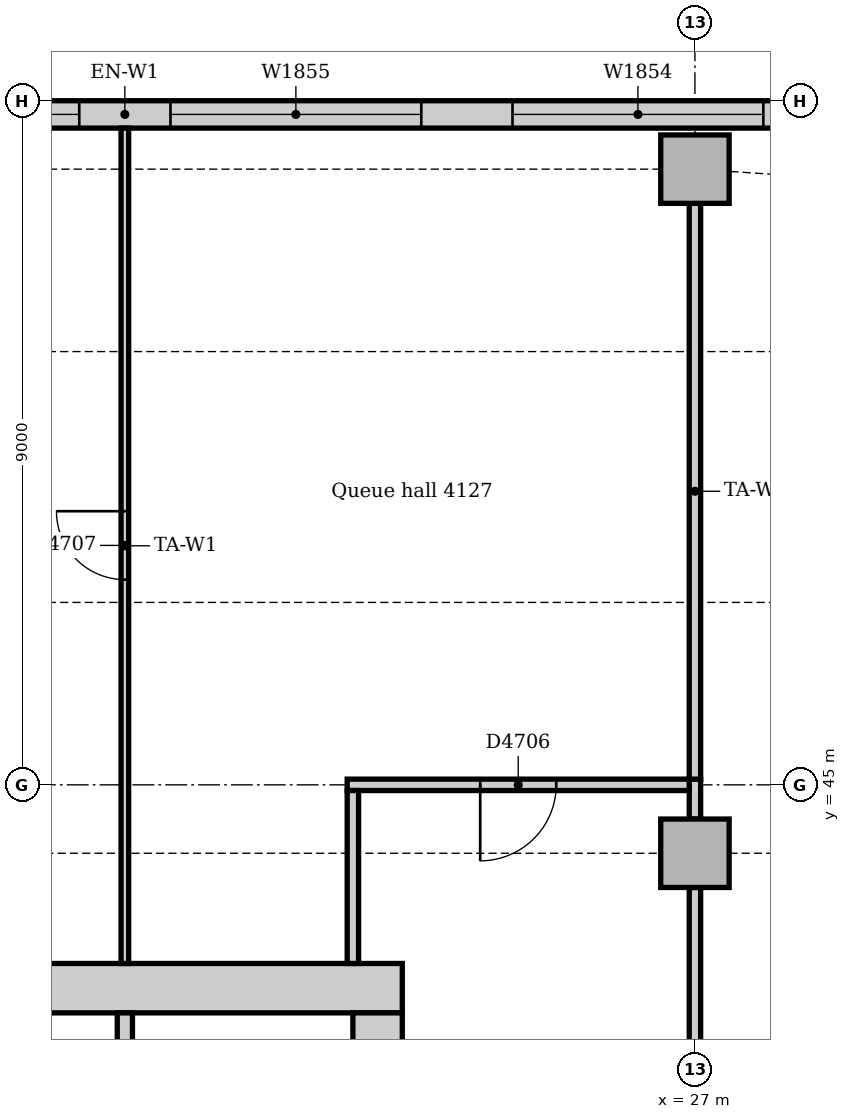
"""IFC4 building model, lengths in metres.
Left out: names, types, materials, properties, quantities, classifications, styles, units other than length and angle.
Written with IfcOpenShell. Run it as: python <this file> out.ifc"""

import sys

from ifc_helpers import new_model, si_unit, direction, frame, frame_2d, origin, origin_2d, place, context, subcontext, project, spatial, rectangle, extrude, element, fill, save


model = new_model("IFC4")
c1 = context("Model", 3, precision=1e-05, world=origin(), true_north=direction((0.0, 1.0)))
c2 = subcontext(c1, "Body", "Model", "MODEL_VIEW")
j1 = project(units=[si_unit("LENGTHUNIT", "METRE"), si_unit("PLANEANGLEUNIT", "RADIAN")], contexts=[c1])
p1 = place(None, origin())
s1 = spatial("IfcSite", under=j1, at=p1, CompositionType="ELEMENT")
p2 = place(p1, origin())
s2 = spatial("IfcBuilding", under=s1, at=p2, CompositionType="ELEMENT")
p3 = place(p2, frame((0.0, 0.0, 173.0)))
s3 = spatial("IfcBuildingStorey", under=s2, at=p3, CompositionType="ELEMENT", Elevation=173.0)
p4 = place(p3, frame((23.15, 42.325, 0.0), z_axis=(0.0, 0.0, 1.0), x_axis=(-1.0, 0.0, 0.0)))
e1 = element("IfcWall", 1, at=p4, inside=s3, PredefinedType="SOLIDWALL", context=c2, shape_type="SweptSolid", body=[
    extrude(rectangle(XDim=19.25, YDim=0.65, at=frame_2d((9.625, 0.0))), origin(), (0.0, 0.0, 1.0), 4.0),
])
p5 = place(p3, frame((22.825, 31.5, 0.0), z_axis=(0.0, 0.0, 1.0), x_axis=(0.0, 1.0, 0.0)))
e2 = element("IfcWall", 2, at=p5, inside=s3, PredefinedType="SOLIDWALL", context=c2, shape_type="SweptSolid", body=[
    extrude(rectangle(XDim=10.5, YDim=0.65, at=frame_2d((5.25, 0.0))), origin(), (0.0, 0.0, 1.0), 4.0),
])
p6 = place(p5, frame((3.15, 0.0, 0.0)))
e3 = element("IfcOpeningElement", 3, at=p6, cuts=e2, PredefinedType="OPENING", context=c2, shape_type="SweptSolid", body=[
    extrude(rectangle(XDim=1.0, YDim=2.1, at=frame_2d((0.5, 1.05))), frame((0.0, 0.335, 0.0), z_axis=(0.0, -1.0, 0.0), x_axis=(1.0, 0.0, 0.0)), (0.0, 0.0, 1.0), 0.67),
])
p7 = place(p5, frame((5.2, 0.0, 0.0)))
e4 = element("IfcOpeningElement", 4, at=p7, cuts=e2, PredefinedType="OPENING", context=c2, shape_type="SweptSolid", body=[
    extrude(rectangle(XDim=1.0, YDim=2.1, at=frame_2d((0.5, 1.05))), frame((0.0, 0.335, 0.0), z_axis=(0.0, -1.0, 0.0), x_axis=(1.0, 0.0, 0.0)), (0.0, 0.0, 1.0), 0.67),
])
for number, where, z_axis, x_axis in (
    (5, (27.0, 53.1, 0.0), (0.0, 0.0, 1.0), (1.0, 0.0, 0.0)),
    (6, (27.0, 44.1, 0.0), (0.0, 0.0, 1.0), (1.0, 0.0, 0.0)),
):
    element("IfcColumn", number, at=place(p3, frame(where, z_axis=z_axis, x_axis=x_axis)), inside=s3, PredefinedType="COLUMN", context=c2, shape_type="SweptSolid", body=[
        extrude(rectangle(XDim=0.9, YDim=0.9, at=origin_2d()), origin(), (0.0, 0.0, 1.0), 3.85),
    ])
p8 = place(p3, frame((34.757, 53.82, 0.0), z_axis=(0.0, 0.0, 1.0), x_axis=(-1.0, 0.0, 0.0)))
e7 = element("IfcWall", 7, at=p8, inside=s3, PredefinedType="STANDARD", context=c2, shape_type="SweptSolid", body=[
    extrude(rectangle(XDim=30.515, YDim=0.36, at=frame_2d((15.257, 0.0))), origin(), (0.0, 0.0, 1.0), 3.85),
])
p9 = place(p8, frame((2.357, 0.0, 0.9)))
e8 = element("IfcOpeningElement", 8, at=p9, cuts=e7, PredefinedType="OPENING", context=c2, shape_type="SweptSolid", body=[
    extrude(rectangle(XDim=3.3, YDim=1.6, at=frame_2d((1.65, 0.8))), frame((0.0, 0.19, 0.0), z_axis=(0.0, -1.0, 0.0), x_axis=(1.0, 0.0, 0.0)), (0.0, 0.0, 1.0), 0.38),
])
p10 = place(p8, frame((6.857, 0.0, 0.9)))
e9 = element("IfcOpeningElement", 9, at=p10, cuts=e7, PredefinedType="OPENING", context=c2, shape_type="SweptSolid", body=[
    extrude(rectangle(XDim=3.3, YDim=1.6, at=frame_2d((1.65, 0.8))), frame((0.0, 0.19, 0.0), z_axis=(0.0, -1.0, 0.0), x_axis=(1.0, 0.0, 0.0)), (0.0, 0.0, 1.0), 0.38),
])
p11 = place(p8, frame((11.357, 0.0, 0.9)))
e10 = element("IfcOpeningElement", 10, at=p11, cuts=e7, PredefinedType="OPENING", context=c2, shape_type="SweptSolid", body=[
    extrude(rectangle(XDim=3.3, YDim=1.6, at=frame_2d((1.65, 0.8))), frame((0.0, 0.19, 0.0), z_axis=(0.0, -1.0, 0.0), x_axis=(1.0, 0.0, 0.0)), (0.0, 0.0, 1.0), 0.38),
])
p12 = place(p8, frame((15.857, 0.0, 0.9)))
e11 = element("IfcOpeningElement", 11, at=p12, cuts=e7, PredefinedType="OPENING", context=c2, shape_type="SweptSolid", body=[
    extrude(rectangle(XDim=3.3, YDim=1.6, at=frame_2d((1.65, 0.8))), frame((0.0, 0.19, 0.0), z_axis=(0.0, -1.0, 0.0), x_axis=(1.0, 0.0, 0.0)), (0.0, 0.0, 1.0), 0.38),
])
p13 = place(p8, frame((20.357, 0.0, 0.9)))
e12 = element("IfcOpeningElement", 12, at=p13, cuts=e7, PredefinedType="OPENING", context=c2, shape_type="SweptSolid", body=[
    extrude(rectangle(XDim=3.3, YDim=1.6, at=frame_2d((1.65, 0.8))), frame((0.0, 0.19, 0.0), z_axis=(0.0, -1.0, 0.0), x_axis=(1.0, 0.0, 0.0)), (0.0, 0.0, 1.0), 0.38),
])
p14 = place(p8, frame((24.857, 0.0, 0.9)))
e13 = element("IfcOpeningElement", 13, at=p14, cuts=e7, PredefinedType="OPENING", context=c2, shape_type="SweptSolid", body=[
    extrude(rectangle(XDim=3.3, YDim=1.6, at=frame_2d((1.65, 0.8))), frame((0.0, 0.19, 0.0), z_axis=(0.0, -1.0, 0.0), x_axis=(1.0, 0.0, 0.0)), (0.0, 0.0, 1.0), 0.38),
])
p15 = place(p3, frame((19.5, 38.6, 0.0), z_axis=(0.0, 0.0, 1.0), x_axis=(0.0, 1.0, 0.0)))
e14 = element("IfcWall", 14, at=p15, inside=s3, PredefinedType="PARTITIONING", context=c2, shape_type="SweptSolid", body=[
    extrude(rectangle(XDim=3.4, YDim=0.2, at=frame_2d((1.7, 0.0))), origin(), (0.0, 0.0, 1.0), 3.85),
])
p16 = place(p3, frame((27.0, 36.45, 0.0), z_axis=(0.0, 0.0, 1.0), x_axis=(0.0, 1.0, 0.0)))
e15 = element("IfcWall", 15, at=p16, inside=s3, PredefinedType="PARTITIONING", context=c2, shape_type="SweptSolid", body=[
    extrude(rectangle(XDim=7.2, YDim=0.15, at=frame_2d((3.6, 0.0))), origin(), (0.0, 0.0, 1.0), 3.362),
])
p17 = place(p3, frame((27.0, 44.55, 0.0), z_axis=(0.0, 0.0, 1.0), x_axis=(0.0, 1.0, 0.0)))
e16 = element("IfcWall", 16, at=p17, inside=s3, PredefinedType="PARTITIONING", context=c2, shape_type="SweptSolid", body=[
    extrude(rectangle(XDim=0.525, YDim=0.15, at=frame_2d((0.263, 0.0))), origin(), (0.0, 0.0, 1.0), 3.362),
])
p18 = place(p3, frame((22.425, 45.0, 0.0), z_axis=(0.0, 0.0, 1.0), x_axis=(1.0, 0.0, 0.0)))
e17 = element("IfcWall", 17, at=p18, inside=s3, PredefinedType="PARTITIONING", context=c2, shape_type="SweptSolid", body=[
    extrude(rectangle(XDim=4.5, YDim=0.15, at=frame_2d((2.25, 0.0))), origin(), (0.0, 0.0, 1.0), 3.85),
])
p19 = place(p18, frame((1.75, 0.0, 0.0)))
e18 = element("IfcOpeningElement", 18, at=p19, cuts=e17, PredefinedType="OPENING", context=c2, shape_type="SweptSolid", body=[
    extrude(rectangle(XDim=1.0, YDim=2.1, at=frame_2d((0.5, 1.05))), frame((0.0, 0.085, 0.0), z_axis=(0.0, -1.0, 0.0), x_axis=(1.0, 0.0, 0.0)), (0.0, 0.0, 1.0), 0.17),
])
p20 = place(p3, frame((22.5, 42.65, 0.0), z_axis=(0.0, 0.0, 1.0), x_axis=(0.0, 1.0, 0.0)))
e19 = element("IfcWall", 19, at=p20, inside=s3, PredefinedType="PARTITIONING", context=c2, shape_type="SweptSolid", body=[
    extrude(rectangle(XDim=2.275, YDim=0.15, at=frame_2d((1.137, 0.0))), origin(), (0.0, 0.0, 1.0), 3.85),
])
p21 = place(p3, frame((27.0, 45.075, 0.0), z_axis=(0.0, 0.0, 1.0), x_axis=(0.0, 1.0, 0.0)))
e20 = element("IfcWall", 20, at=p21, inside=s3, PredefinedType="PARTITIONING", context=c2, shape_type="SweptSolid", body=[
    extrude(rectangle(XDim=7.575, YDim=0.15, at=frame_2d((3.788, 0.0))), origin(), (0.0, 0.0, 1.0), 3.362),
])
p22 = place(p3, frame((19.5, 42.65, 0.0), z_axis=(0.0, 0.0, 1.0), x_axis=(0.0, 1.0, 0.0)))
e21 = element("IfcWall", 21, at=p22, inside=s3, PredefinedType="PARTITIONING", context=c2, shape_type="SweptSolid", body=[
    extrude(rectangle(XDim=10.99, YDim=0.1, at=frame_2d((5.495, 0.0))), origin(), (0.0, 0.0, 1.0), 3.85),
])
p23 = place(p22, frame((5.05, 0.0, 0.0)))
e22 = element("IfcOpeningElement", 22, at=p23, cuts=e21, PredefinedType="OPENING", context=c2, shape_type="SweptSolid", body=[
    extrude(rectangle(XDim=0.9, YDim=2.1, at=frame_2d((0.45, 1.05))), frame((0.0, 0.06, 0.0), z_axis=(0.0, -1.0, 0.0), x_axis=(1.0, 0.0, 0.0)), (0.0, 0.0, 1.0), 0.12),
])
p24 = place(p10, origin())
e23 = element("IfcWindow", 23, at=p24, inside=s3, PartitioningType="SINGLE_PANEL", PredefinedType="WINDOW", context=c2, shape_type="SweptSolid", body=[
    extrude(rectangle(XDim=3.3, YDim=1.6, at=frame_2d((1.65, 0.8))), frame((0.0, 0.13, 0.0), z_axis=(0.0, -1.0, 0.0), x_axis=(1.0, 0.0, 0.0)), (0.0, 0.0, 1.0), 0.06),
])
fill(e9, e23)
p25 = place(p11, origin())
e24 = element("IfcWindow", 24, at=p25, inside=s3, PartitioningType="SINGLE_PANEL", PredefinedType="WINDOW", context=c2, shape_type="SweptSolid", body=[
    extrude(rectangle(XDim=3.3, YDim=1.6, at=frame_2d((1.65, 0.8))), frame((0.0, 0.13, 0.0), z_axis=(0.0, -1.0, 0.0), x_axis=(1.0, 0.0, 0.0)), (0.0, 0.0, 1.0), 0.06),
])
fill(e10, e24)
p26 = place(p12, origin())
e25 = element("IfcWindow", 25, at=p26, inside=s3, PartitioningType="SINGLE_PANEL", PredefinedType="WINDOW", context=c2, shape_type="SweptSolid", body=[
    extrude(rectangle(XDim=3.3, YDim=1.6, at=frame_2d((1.65, 0.8))), frame((0.0, 0.13, 0.0), z_axis=(0.0, -1.0, 0.0), x_axis=(1.0, 0.0, 0.0)), (0.0, 0.0, 1.0), 0.06),
])
fill(e11, e25)
p27 = place(p19, frame((1.0, 0.0, 0.0), z_axis=(0.0, 0.0, 1.0), x_axis=(-1.0, 0.0, 0.0)))
e26 = element("IfcDoor", 26, at=p27, inside=s3, OperationType="SINGLE_SWING_RIGHT", PredefinedType="DOOR", context=c2, shape_type="SweptSolid", body=[
    extrude(rectangle(XDim=1.0, YDim=2.1, at=frame_2d((0.5, 1.05))), frame((0.0, 0.025, 0.0), z_axis=(0.0, -1.0, 0.0), x_axis=(1.0, 0.0, 0.0)), (0.0, 0.0, 1.0), 0.05),
])
fill(e18, e26)
p28 = place(p23, origin())
e27 = element("IfcDoor", 27, at=p28, inside=s3, OperationType="SINGLE_SWING_RIGHT", PredefinedType="DOOR", context=c2, shape_type="SweptSolid", body=[
    extrude(rectangle(XDim=0.9, YDim=2.1, at=frame_2d((0.45, 1.05))), frame((0.0, 0.025, 0.0), z_axis=(0.0, -1.0, 0.0), x_axis=(1.0, 0.0, 0.0)), (0.0, 0.0, 1.0), 0.05),
])
fill(e22, e27)
save(model, sys.argv[1])
